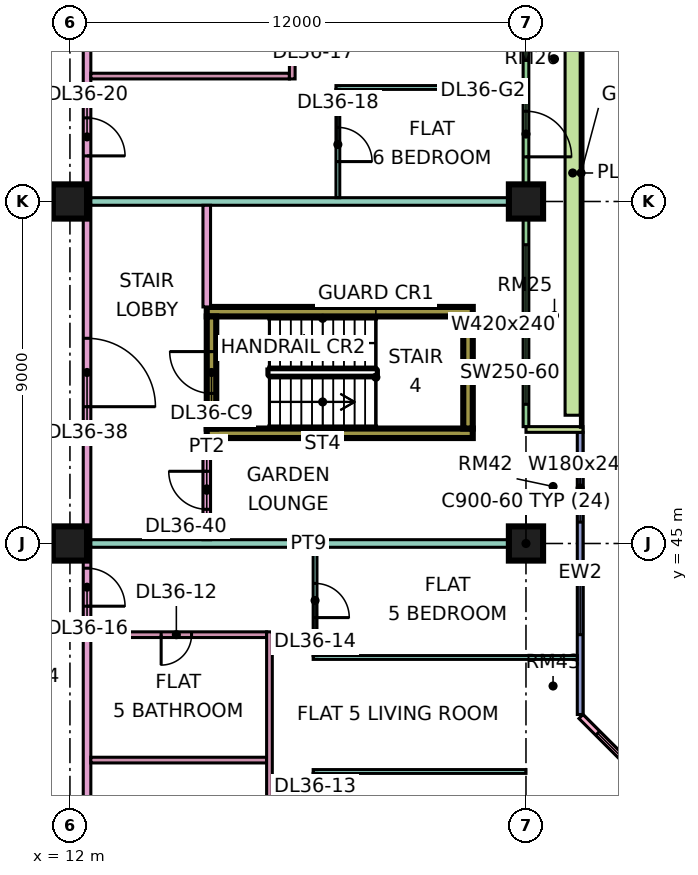
"""IFC4 building model, lengths in metres.
Left out: names, types, materials, properties, quantities, classifications, styles, units other than length and angle.
Written with IfcOpenShell. Run it as: python <this file> out.ifc"""

import sys

from ifc_helpers import new_model, si_unit, direction, frame, frame_2d, origin, origin_2d, place, context, subcontext, project, spatial, rectangle, extrude, element, fill, save


model = new_model("IFC4")
c1 = context("Model", 3, precision=1e-05, world=origin(), true_north=direction((0.0, 1.0)))
c2 = subcontext(c1, "Body", "Model", "MODEL_VIEW")
j1 = project(units=[si_unit("LENGTHUNIT", "METRE"), si_unit("PLANEANGLEUNIT", "RADIAN")], contexts=[c1])
p1 = place(None, origin())
s1 = spatial("IfcSite", under=j1, at=p1, CompositionType="ELEMENT")
p2 = place(p1, origin())
s2 = spatial("IfcBuilding", under=s1, at=p2, CompositionType="ELEMENT")
p3 = place(p2, frame((0.0, 0.0, 161.15)))
s3 = spatial("IfcBuildingStorey", under=s2, at=p3, CompositionType="ELEMENT", Elevation=161.15)
for number, where, z_axis, x_axis in (
    (1, (12.0, 45.0, 0.0), (0.0, 0.0, 1.0), (1.0, 0.0, 0.0)),
    (2, (12.0, 54.0, 0.0), (0.0, 0.0, 1.0), (1.0, 0.0, 0.0)),
    (3, (24.0, 45.0, 0.0), (0.0, 0.0, 1.0), (1.0, 0.0, 0.0)),
    (4, (24.0, 54.0, 0.0), (0.0, 0.0, 1.0), (1.0, 0.0, 0.0)),
):
    element("IfcColumn", number, at=place(p3, frame(where, z_axis=z_axis, x_axis=x_axis)), inside=s3, PredefinedType="COLUMN", context=c2, shape_type="SweptSolid", body=[
        extrude(rectangle(XDim=0.9, YDim=0.9, at=origin_2d()), origin(), (0.0, 0.0, 1.0), 3.75),
    ])
for number, where, z_axis, x_axis in (
    (5, (15.6, 47.9, 0.0), (0.0, 0.0, 1.0), (1.0, 0.0, 0.0)),
    (6, (15.6, 51.1, 0.0), (0.0, 0.0, 1.0), (1.0, 0.0, 0.0)),
):
    element("IfcWall", number, at=place(p3, frame(where, z_axis=z_axis, x_axis=x_axis)), inside=s3, PredefinedType="SHEAR", context=c2, shape_type="SweptSolid", body=[
        extrude(rectangle(XDim=7.0, YDim=0.25, at=frame_2d((3.5, 0.0))), origin(), (0.0, 0.0, 1.0), 3.75),
    ])
p4 = place(p3, frame((15.725, 48.025, 0.0), z_axis=(0.0, 0.0, 1.0), x_axis=(0.0, 1.0, 0.0)))
e7 = element("IfcWall", 7, at=p4, inside=s3, PredefinedType="SHEAR", context=c2, shape_type="SweptSolid", body=[
    extrude(rectangle(XDim=2.95, YDim=0.25, at=frame_2d((1.475, 0.0))), origin(), (0.0, 0.0, 1.0), 3.75),
])
p5 = place(p4, frame((0.925, 0.0, 0.0)))
e8 = element("IfcOpeningElement", 8, at=p5, cuts=e7, PredefinedType="OPENING", context=c2, shape_type="SweptSolid", body=[
    extrude(rectangle(XDim=1.1, YDim=2.2, at=frame_2d((0.55, 1.1))), frame((0.0, 0.135, 0.0), z_axis=(0.0, -1.0, 0.0), x_axis=(1.0, 0.0, 0.0)), (0.0, 0.0, 1.0), 0.27),
])
p6 = place(p3, frame((22.475, 48.025, 0.0), z_axis=(0.0, 0.0, 1.0), x_axis=(0.0, 1.0, 0.0)))
e9 = element("IfcWall", 9, at=p6, inside=s3, PredefinedType="SHEAR", context=c2, shape_type="SweptSolid", body=[
    extrude(rectangle(XDim=2.95, YDim=0.25, at=frame_2d((1.475, 0.0))), origin(), (0.0, 0.0, 1.0), 3.75),
])
p7 = place(p3, frame((28.447, 37.447, 0.0), z_axis=(0.0, 0.0, 1.0), x_axis=(-0.707106781187, 0.707106781187, 0.0)))
e10 = element("IfcWall", 10, at=p7, inside=s3, PredefinedType="SOLIDWALL", context=c2, shape_type="SweptSolid", body=[
    extrude(rectangle(XDim=4.243, YDim=0.15, at=frame_2d((2.121, 0.0))), origin(), (0.0, 0.0, 1.0), 3.35),
])
p8 = place(p7, frame((0.621, 0.0, 0.45)))
e11 = element("IfcOpeningElement", 11, at=p8, cuts=e10, PredefinedType="OPENING", context=c2, shape_type="SweptSolid", body=[
    extrude(rectangle(XDim=3.0, YDim=2.4, at=frame_2d((1.5, 1.2))), frame((0.0, 0.085, 0.0), z_axis=(0.0, -1.0, 0.0), x_axis=(1.0, 0.0, 0.0)), (0.0, 0.0, 1.0), 0.17),
])
p9 = place(p3, frame((25.425, 40.5, 0.0), z_axis=(0.0, 0.0, 1.0), x_axis=(0.0, 1.0, 0.0)))
e12 = element("IfcWall", 12, at=p9, inside=s3, PredefinedType="SOLIDWALL", context=c2, shape_type="SweptSolid", body=[
    extrude(rectangle(XDim=7.425, YDim=0.15, at=frame_2d((3.712, 0.0))), origin(), (0.0, 0.0, 1.0), 3.35),
])
p10 = place(p9, frame((2.1, 0.0, 0.45)))
e13 = element("IfcOpeningElement", 13, at=p10, cuts=e12, PredefinedType="OPENING", context=c2, shape_type="SweptSolid", body=[
    extrude(rectangle(XDim=1.8, YDim=2.4, at=frame_2d((0.9, 1.2))), frame((0.0, 0.085, 0.0), z_axis=(0.0, -1.0, 0.0), x_axis=(1.0, 0.0, 0.0)), (0.0, 0.0, 1.0), 0.17),
])
p11 = place(p9, frame((5.062, 0.0, 0.45)))
e14 = element("IfcOpeningElement", 14, at=p11, cuts=e12, PredefinedType="OPENING", context=c2, shape_type="SweptSolid", body=[
    extrude(rectangle(XDim=1.8, YDim=2.4, at=frame_2d((0.9, 1.2))), frame((0.0, 0.085, 0.0), z_axis=(0.0, -1.0, 0.0), x_axis=(1.0, 0.0, 0.0)), (0.0, 0.0, 1.0), 0.17),
])
p12 = place(p3, frame((24.0, 48.075, 0.0), z_axis=(0.0, 0.0, 1.0), x_axis=(0.0, 1.0, 0.0)))
e15 = element("IfcWall", 15, at=p12, inside=s3, PredefinedType="SOLIDWALL", context=c2, shape_type="SweptSolid", body=[
    extrude(rectangle(XDim=13.35, YDim=0.15, at=frame_2d((6.675, 0.0))), origin(), (0.0, 0.0, 1.0), 3.35),
])
p13 = place(p12, frame((0.587, 0.0, 0.45)))
e16 = element("IfcOpeningElement", 16, at=p13, cuts=e15, PredefinedType="OPENING", context=c2, shape_type="SweptSolid", body=[
    extrude(rectangle(XDim=4.2, YDim=2.4, at=frame_2d((2.1, 1.2))), frame((0.0, 0.085, 0.0), z_axis=(0.0, -1.0, 0.0), x_axis=(1.0, 0.0, 0.0)), (0.0, 0.0, 1.0), 0.17),
])
p14 = place(p12, frame((7.1, 0.0, 0.0)))
e17 = element("IfcOpeningElement", 17, at=p14, cuts=e15, PredefinedType="OPENING", context=c2, shape_type="SweptSolid", body=[
    extrude(rectangle(XDim=1.2, YDim=2.4, at=frame_2d((0.6, 1.2))), frame((0.0, 0.085, 0.0), z_axis=(0.0, -1.0, 0.0), x_axis=(1.0, 0.0, 0.0)), (0.0, 0.0, 1.0), 0.17),
])
p15 = place(p12, frame((9.637, 0.0, 0.45)))
e18 = element("IfcOpeningElement", 18, at=p15, cuts=e15, PredefinedType="OPENING", context=c2, shape_type="SweptSolid", body=[
    extrude(rectangle(XDim=3.0, YDim=2.4, at=frame_2d((1.5, 1.2))), frame((0.0, 0.085, 0.0), z_axis=(0.0, -1.0, 0.0), x_axis=(1.0, 0.0, 0.0)), (0.0, 0.0, 1.0), 0.17),
])
p16 = place(p3, frame((25.5, 48.0, 0.0), z_axis=(0.0, 0.0, 1.0), x_axis=(-1.0, 0.0, 0.0)))
e19 = element("IfcWall", 19, at=p16, inside=s3, PredefinedType="SOLIDWALL", context=c2, shape_type="SweptSolid", body=[
    extrude(rectangle(XDim=1.5, YDim=0.15, at=frame_2d((0.75, 0.0))), origin(), (0.0, 0.0, 1.0), 3.35),
])
p17 = place(p3, frame((25.229, 48.375, 0.0), z_axis=(0.0, 0.0, 1.0), x_axis=(0.0, 1.0, 0.0)))
e20 = element("IfcWall", 20, at=p17, inside=s3, PredefinedType="SOLIDWALL", context=c2, shape_type="SweptSolid", body=[
    extrude(rectangle(XDim=12.75, YDim=0.4, at=frame_2d((6.375, 0.0))), origin(), (0.0, 0.0, 1.0), 0.7),
])
p18 = place(p3, frame((12.45, 20.0, 0.0), z_axis=(0.0, 0.0, 1.0), x_axis=(0.0, 1.0, 0.0)))
e21 = element("IfcWall", 21, at=p18, inside=s3, PredefinedType="PARTITIONING", context=c2, shape_type="SweptSolid", body=[
    extrude(rectangle(XDim=43.0, YDim=0.2, at=frame_2d((21.5, 0.0))), origin(), (0.0, 0.0, 1.0), 3.35),
])
p19 = place(p18, frame((5.95, 0.0, 0.0)))
e22 = element("IfcOpeningElement", 22, at=p19, cuts=e21, PredefinedType="OPENING", context=c2, shape_type="SweptSolid", body=[
    extrude(rectangle(XDim=1.0, YDim=2.1, at=frame_2d((0.5, 1.05))), frame((0.0, 0.11, 0.0), z_axis=(0.0, -1.0, 0.0), x_axis=(1.0, 0.0, 0.0)), (0.0, 0.0, 1.0), 0.22),
])
p20 = place(p18, frame((12.0, 0.0, 0.0)))
e23 = element("IfcOpeningElement", 23, at=p20, cuts=e21, PredefinedType="OPENING", context=c2, shape_type="SweptSolid", body=[
    extrude(rectangle(XDim=1.0, YDim=2.1, at=frame_2d((0.5, 1.05))), frame((0.0, 0.11, 0.0), z_axis=(0.0, -1.0, 0.0), x_axis=(1.0, 0.0, 0.0)), (0.0, 0.0, 1.0), 0.22),
])
p21 = place(p18, frame((23.35, 0.0, 0.0)))
e24 = element("IfcOpeningElement", 24, at=p21, cuts=e21, PredefinedType="OPENING", context=c2, shape_type="SweptSolid", body=[
    extrude(rectangle(XDim=1.0, YDim=2.1, at=frame_2d((0.5, 1.05))), frame((0.0, 0.11, 0.0), z_axis=(0.0, -1.0, 0.0), x_axis=(1.0, 0.0, 0.0)), (0.0, 0.0, 1.0), 0.22),
])
p22 = place(p18, frame((35.2, 0.0, 0.0)))
e25 = element("IfcOpeningElement", 25, at=p22, cuts=e21, PredefinedType="OPENING", context=c2, shape_type="SweptSolid", body=[
    extrude(rectangle(XDim=1.0, YDim=2.1, at=frame_2d((0.5, 1.05))), frame((0.0, 0.11, 0.0), z_axis=(0.0, -1.0, 0.0), x_axis=(1.0, 0.0, 0.0)), (0.0, 0.0, 1.0), 0.22),
])
p23 = place(p18, frame((1.15, 0.0, 0.0)))
e26 = element("IfcOpeningElement", 26, at=p23, cuts=e21, PredefinedType="OPENING", context=c2, shape_type="SweptSolid", body=[
    extrude(rectangle(XDim=1.8, YDim=2.1, at=frame_2d((0.9, 1.05))), frame((0.0, 0.11, 0.0), z_axis=(0.0, -1.0, 0.0), x_axis=(1.0, 0.0, 0.0)), (0.0, 0.0, 1.0), 0.22),
])
p24 = place(p18, frame((28.6, 0.0, 0.0)))
e27 = element("IfcOpeningElement", 27, at=p24, cuts=e21, PredefinedType="OPENING", context=c2, shape_type="SweptSolid", body=[
    extrude(rectangle(XDim=1.8, YDim=2.1, at=frame_2d((0.9, 1.05))), frame((0.0, 0.11, 0.0), z_axis=(0.0, -1.0, 0.0), x_axis=(1.0, 0.0, 0.0)), (0.0, 0.0, 1.0), 0.22),
])
p25 = place(p3, frame((12.55, 39.3, 0.0), z_axis=(0.0, 0.0, 1.0), x_axis=(1.0, 0.0, 0.0)))
e28 = element("IfcWall", 28, at=p25, inside=s3, PredefinedType="PARTITIONING", context=c2, shape_type="SweptSolid", body=[
    extrude(rectangle(XDim=4.625, YDim=0.15, at=frame_2d((2.312, 0.0))), origin(), (0.0, 0.0, 1.0), 3.35),
])
p26 = place(p3, frame((12.55, 42.6, 0.0), z_axis=(0.0, 0.0, 1.0), x_axis=(1.0, 0.0, 0.0)))
e29 = element("IfcWall", 29, at=p26, inside=s3, PredefinedType="PARTITIONING", context=c2, shape_type="SweptSolid", body=[
    extrude(rectangle(XDim=4.625, YDim=0.15, at=frame_2d((2.312, 0.0))), origin(), (0.0, 0.0, 1.0), 3.35),
])
p27 = place(p26, frame((1.85, 0.0, 0.0)))
e30 = element("IfcOpeningElement", 30, at=p27, cuts=e29, PredefinedType="OPENING", context=c2, shape_type="SweptSolid", body=[
    extrude(rectangle(XDim=0.8, YDim=2.1, at=frame_2d((0.4, 1.05))), frame((0.0, 0.085, 0.0), z_axis=(0.0, -1.0, 0.0), x_axis=(1.0, 0.0, 0.0)), (0.0, 0.0, 1.0), 0.17),
])
p28 = place(p3, frame((12.55, 45.0, 0.0), z_axis=(0.0, 0.0, 1.0), x_axis=(1.0, 0.0, 0.0)))
e31 = element("IfcWall", 31, at=p28, inside=s3, PredefinedType="PARTITIONING", context=c2, shape_type="SweptSolid", body=[
    extrude(rectangle(XDim=11.45, YDim=0.2, at=frame_2d((5.725, 0.0))), origin(), (0.0, 0.0, 1.0), 3.35),
])
p29 = place(p3, frame((12.55, 54.0, 0.0), z_axis=(0.0, 0.0, 1.0), x_axis=(1.0, 0.0, 0.0)))
e32 = element("IfcWall", 32, at=p29, inside=s3, PredefinedType="PARTITIONING", context=c2, shape_type="SweptSolid", body=[
    extrude(rectangle(XDim=11.376, YDim=0.2, at=frame_2d((5.688, 0.0))), origin(), (0.0, 0.0, 1.0), 3.35),
])
p30 = place(p3, frame((12.55, 57.3, 0.0), z_axis=(0.0, 0.0, 1.0), x_axis=(1.0, 0.0, 0.0)))
e33 = element("IfcWall", 33, at=p30, inside=s3, PredefinedType="PARTITIONING", context=c2, shape_type="SweptSolid", body=[
    extrude(rectangle(XDim=5.225, YDim=0.15, at=frame_2d((2.612, 0.0))), origin(), (0.0, 0.0, 1.0), 3.35),
])
p31 = place(p3, frame((15.6, 45.1, 0.0), z_axis=(0.0, 0.0, 1.0), x_axis=(0.0, 1.0, 0.0)))
e34 = element("IfcWall", 34, at=p31, inside=s3, PredefinedType="PARTITIONING", context=c2, shape_type="SweptSolid", body=[
    extrude(rectangle(XDim=2.675, YDim=0.2, at=frame_2d((1.337, 0.0))), origin(), (0.0, 0.0, 1.0), 3.35),
])
p32 = place(p31, frame((0.8, 0.0, 0.0)))
e35 = element("IfcOpeningElement", 35, at=p32, cuts=e34, PredefinedType="OPENING", context=c2, shape_type="SweptSolid", body=[
    extrude(rectangle(XDim=1.0, YDim=2.1, at=frame_2d((0.5, 1.05))), frame((0.0, 0.11, 0.0), z_axis=(0.0, -1.0, 0.0), x_axis=(1.0, 0.0, 0.0)), (0.0, 0.0, 1.0), 0.22),
])
p33 = place(p3, frame((15.6, 51.225, 0.0), z_axis=(0.0, 0.0, 1.0), x_axis=(0.0, 1.0, 0.0)))
e36 = element("IfcWall", 36, at=p33, inside=s3, PredefinedType="PARTITIONING", context=c2, shape_type="SweptSolid", body=[
    extrude(rectangle(XDim=2.675, YDim=0.2, at=frame_2d((1.337, 0.0))), origin(), (0.0, 0.0, 1.0), 3.35),
])
p34 = place(p3, frame((17.25, 36.1, 0.0), z_axis=(0.0, 0.0, 1.0), x_axis=(0.0, 1.0, 0.0)))
e37 = element("IfcWall", 37, at=p34, inside=s3, PredefinedType="PARTITIONING", context=c2, shape_type="SweptSolid", body=[
    extrude(rectangle(XDim=6.575, YDim=0.15, at=frame_2d((3.288, 0.0))), origin(), (0.0, 0.0, 1.0), 3.35),
])
p35 = place(p34, frame((1.1, 0.0, 0.0)))
e38 = element("IfcOpeningElement", 38, at=p35, cuts=e37, PredefinedType="OPENING", context=c2, shape_type="SweptSolid", body=[
    extrude(rectangle(XDim=0.9, YDim=2.1, at=frame_2d((0.45, 1.05))), frame((0.0, 0.085, 0.0), z_axis=(0.0, -1.0, 0.0), x_axis=(1.0, 0.0, 0.0)), (0.0, 0.0, 1.0), 0.17),
])
p36 = place(p3, frame((17.85, 57.225, 0.0), z_axis=(0.0, 0.0, 1.0), x_axis=(0.0, 1.0, 0.0)))
e39 = element("IfcWall", 39, at=p36, inside=s3, PredefinedType="PARTITIONING", context=c2, shape_type="SweptSolid", body=[
    extrude(rectangle(XDim=7.125, YDim=0.15, at=frame_2d((3.562, 0.0))), origin(), (0.0, 0.0, 1.0), 3.35),
])
p37 = place(p36, frame((1.225, 0.0, 0.0)))
e40 = element("IfcOpeningElement", 40, at=p37, cuts=e39, PredefinedType="OPENING", context=c2, shape_type="SweptSolid", body=[
    extrude(rectangle(XDim=0.8, YDim=2.1, at=frame_2d((0.4, 1.05))), frame((0.0, 0.085, 0.0), z_axis=(0.0, -1.0, 0.0), x_axis=(1.0, 0.0, 0.0)), (0.0, 0.0, 1.0), 0.17),
])
p38 = place(p36, frame((3.975, 0.0, 0.0)))
e41 = element("IfcOpeningElement", 41, at=p38, cuts=e39, PredefinedType="OPENING", context=c2, shape_type="SweptSolid", body=[
    extrude(rectangle(XDim=0.9, YDim=2.1, at=frame_2d((0.45, 1.05))), frame((0.0, 0.085, 0.0), z_axis=(0.0, -1.0, 0.0), x_axis=(1.0, 0.0, 0.0)), (0.0, 0.0, 1.0), 0.17),
])
p39 = place(p3, frame((18.4, 39.0, 0.0), z_axis=(0.0, 0.0, 1.0), x_axis=(1.0, 0.0, 0.0)))
e42 = element("IfcWall", 42, at=p39, inside=s3, PredefinedType="PARTITIONING", context=c2, shape_type="SweptSolid", body=[
    extrude(rectangle(XDim=5.6, YDim=0.1, at=frame_2d((2.8, 0.0))), origin(), (0.0, 0.0, 1.0), 3.35),
])
p40 = place(p3, frame((18.4, 42.0, 0.0), z_axis=(0.0, 0.0, 1.0), x_axis=(1.0, 0.0, 0.0)))
e43 = element("IfcWall", 43, at=p40, inside=s3, PredefinedType="PARTITIONING", context=c2, shape_type="SweptSolid", body=[
    extrude(rectangle(XDim=6.95, YDim=0.1, at=frame_2d((3.475, 0.0))), origin(), (0.0, 0.0, 1.0), 3.35),
])
p41 = place(p3, frame((18.45, 36.1, 0.0), z_axis=(0.0, 0.0, 1.0), x_axis=(0.0, 1.0, 0.0)))
e44 = element("IfcWall", 44, at=p41, inside=s3, PredefinedType="PARTITIONING", context=c2, shape_type="SweptSolid", body=[
    extrude(rectangle(XDim=2.85, YDim=0.1, at=frame_2d((1.425, 0.0))), origin(), (0.0, 0.0, 1.0), 3.35),
])
p42 = place(p41, frame((0.95, 0.0, 0.0)))
e45 = element("IfcOpeningElement", 45, at=p42, cuts=e44, PredefinedType="OPENING", context=c2, shape_type="SweptSolid", body=[
    extrude(rectangle(XDim=0.9, YDim=2.1, at=frame_2d((0.45, 1.05))), frame((0.0, 0.06, 0.0), z_axis=(0.0, -1.0, 0.0), x_axis=(1.0, 0.0, 0.0)), (0.0, 0.0, 1.0), 0.12),
])
p43 = place(p3, frame((18.45, 42.05, 0.0), z_axis=(0.0, 0.0, 1.0), x_axis=(0.0, 1.0, 0.0)))
e46 = element("IfcWall", 46, at=p43, inside=s3, PredefinedType="PARTITIONING", context=c2, shape_type="SweptSolid", body=[
    extrude(rectangle(XDim=2.85, YDim=0.1, at=frame_2d((1.425, 0.0))), origin(), (0.0, 0.0, 1.0), 3.35),
])
p44 = place(p43, frame((1.0, 0.0, 0.0)))
e47 = element("IfcOpeningElement", 47, at=p44, cuts=e46, PredefinedType="OPENING", context=c2, shape_type="SweptSolid", body=[
    extrude(rectangle(XDim=0.9, YDim=2.1, at=frame_2d((0.45, 1.05))), frame((0.0, 0.06, 0.0), z_axis=(0.0, -1.0, 0.0), x_axis=(1.0, 0.0, 0.0)), (0.0, 0.0, 1.0), 0.12),
])
p45 = place(p3, frame((19.0, 57.0, 0.0), z_axis=(0.0, 0.0, 1.0), x_axis=(1.0, 0.0, 0.0)))
e48 = element("IfcWall", 48, at=p45, inside=s3, PredefinedType="PARTITIONING", context=c2, shape_type="SweptSolid", body=[
    extrude(rectangle(XDim=4.926, YDim=0.1, at=frame_2d((2.463, 0.0))), origin(), (0.0, 0.0, 1.0), 3.35),
])
p46 = place(p3, frame((19.05, 54.1, 0.0), z_axis=(0.0, 0.0, 1.0), x_axis=(0.0, 1.0, 0.0)))
e49 = element("IfcWall", 49, at=p46, inside=s3, PredefinedType="PARTITIONING", context=c2, shape_type="SweptSolid", body=[
    extrude(rectangle(XDim=2.85, YDim=0.1, at=frame_2d((1.425, 0.0))), origin(), (0.0, 0.0, 1.0), 3.35),
])
p47 = place(p46, frame((0.95, 0.0, 0.0)))
e50 = element("IfcOpeningElement", 50, at=p47, cuts=e49, PredefinedType="OPENING", context=c2, shape_type="SweptSolid", body=[
    extrude(rectangle(XDim=0.9, YDim=2.1, at=frame_2d((0.45, 1.05))), frame((0.0, 0.06, 0.0), z_axis=(0.0, -1.0, 0.0), x_axis=(1.0, 0.0, 0.0)), (0.0, 0.0, 1.0), 0.12),
])
p48 = place(p8, origin())
e51 = element("IfcWindow", 51, at=p48, inside=s3, PartitioningType="SINGLE_PANEL", PredefinedType="WINDOW", context=c2, shape_type="SweptSolid", body=[
    extrude(rectangle(XDim=3.0, YDim=2.4, at=frame_2d((1.5, 1.2))), frame((0.0, 0.03, 0.0), z_axis=(0.0, -1.0, 0.0), x_axis=(1.0, 0.0, 0.0)), (0.0, 0.0, 1.0), 0.06),
])
fill(e11, e51)
p49 = place(p10, origin())
e52 = element("IfcWindow", 52, at=p49, inside=s3, PartitioningType="SINGLE_PANEL", PredefinedType="WINDOW", context=c2, shape_type="SweptSolid", body=[
    extrude(rectangle(XDim=1.8, YDim=2.4, at=frame_2d((0.9, 1.2))), frame((0.0, 0.03, 0.0), z_axis=(0.0, -1.0, 0.0), x_axis=(1.0, 0.0, 0.0)), (0.0, 0.0, 1.0), 0.06),
])
fill(e13, e52)
p50 = place(p11, origin())
e53 = element("IfcWindow", 53, at=p50, inside=s3, PartitioningType="SINGLE_PANEL", PredefinedType="WINDOW", context=c2, shape_type="SweptSolid", body=[
    extrude(rectangle(XDim=1.8, YDim=2.4, at=frame_2d((0.9, 1.2))), frame((0.0, 0.03, 0.0), z_axis=(0.0, -1.0, 0.0), x_axis=(1.0, 0.0, 0.0)), (0.0, 0.0, 1.0), 0.06),
])
fill(e14, e53)
p51 = place(p13, origin())
e54 = element("IfcWindow", 54, at=p51, inside=s3, PartitioningType="SINGLE_PANEL", PredefinedType="WINDOW", context=c2, shape_type="SweptSolid", body=[
    extrude(rectangle(XDim=4.2, YDim=2.4, at=frame_2d((2.1, 1.2))), frame((0.0, 0.03, 0.0), z_axis=(0.0, -1.0, 0.0), x_axis=(1.0, 0.0, 0.0)), (0.0, 0.0, 1.0), 0.06),
])
fill(e16, e54)
p52 = place(p14, frame((1.2, 0.0, 0.0), z_axis=(0.0, 0.0, 1.0), x_axis=(-1.0, 0.0, 0.0)))
e55 = element("IfcDoor", 55, at=p52, inside=s3, OperationType="DOUBLE_DOOR_SINGLE_SWING", PredefinedType="DOOR", context=c2, shape_type="SweptSolid", body=[
    extrude(rectangle(XDim=1.2, YDim=2.4, at=frame_2d((0.6, 1.2))), frame((0.0, 0.025, 0.0), z_axis=(0.0, -1.0, 0.0), x_axis=(1.0, 0.0, 0.0)), (0.0, 0.0, 1.0), 0.05),
])
fill(e17, e55)
p53 = place(p15, origin())
e56 = element("IfcWindow", 56, at=p53, inside=s3, PartitioningType="SINGLE_PANEL", PredefinedType="WINDOW", context=c2, shape_type="SweptSolid", body=[
    extrude(rectangle(XDim=3.0, YDim=2.4, at=frame_2d((1.5, 1.2))), frame((0.0, 0.03, 0.0), z_axis=(0.0, -1.0, 0.0), x_axis=(1.0, 0.0, 0.0)), (0.0, 0.0, 1.0), 0.06),
])
fill(e18, e56)
p54 = place(p5, frame((1.1, 0.0, 0.0), z_axis=(0.0, 0.0, 1.0), x_axis=(-1.0, 0.0, 0.0)))
e57 = element("IfcDoor", 57, at=p54, inside=s3, OperationType="SINGLE_SWING_RIGHT", PredefinedType="DOOR", context=c2, shape_type="SweptSolid", body=[
    extrude(rectangle(XDim=1.1, YDim=2.2, at=frame_2d((0.55, 1.1))), frame((0.0, 0.025, 0.0), z_axis=(0.0, -1.0, 0.0), x_axis=(1.0, 0.0, 0.0)), (0.0, 0.0, 1.0), 0.05),
])
fill(e8, e57)
p55 = place(p27, frame((0.8, 0.0, 0.0), z_axis=(0.0, 0.0, 1.0), x_axis=(-1.0, 0.0, 0.0)))
e58 = element("IfcDoor", 58, at=p55, inside=s3, OperationType="SINGLE_SWING_LEFT", PredefinedType="DOOR", context=c2, shape_type="SweptSolid", body=[
    extrude(rectangle(XDim=0.8, YDim=2.1, at=frame_2d((0.4, 1.05))), frame((0.0, 0.025, 0.0), z_axis=(0.0, -1.0, 0.0), x_axis=(1.0, 0.0, 0.0)), (0.0, 0.0, 1.0), 0.05),
])
fill(e30, e58)
p56 = place(p44, frame((0.9, 0.0, 0.0), z_axis=(0.0, 0.0, 1.0), x_axis=(-1.0, 0.0, 0.0)))
e59 = element("IfcDoor", 59, at=p56, inside=s3, OperationType="SINGLE_SWING_LEFT", PredefinedType="DOOR", context=c2, shape_type="SweptSolid", body=[
    extrude(rectangle(XDim=0.9, YDim=2.1, at=frame_2d((0.45, 1.05))), frame((0.0, 0.025, 0.0), z_axis=(0.0, -1.0, 0.0), x_axis=(1.0, 0.0, 0.0)), (0.0, 0.0, 1.0), 0.05),
])
fill(e47, e59)
p57 = place(p21, frame((1.0, 0.0, 0.0), z_axis=(0.0, 0.0, 1.0), x_axis=(-1.0, 0.0, 0.0)))
e60 = element("IfcDoor", 60, at=p57, inside=s3, OperationType="SINGLE_SWING_LEFT", PredefinedType="DOOR", context=c2, shape_type="SweptSolid", body=[
    extrude(rectangle(XDim=1.0, YDim=2.1, at=frame_2d((0.5, 1.05))), frame((0.0, 0.025, 0.0), z_axis=(0.0, -1.0, 0.0), x_axis=(1.0, 0.0, 0.0)), (0.0, 0.0, 1.0), 0.05),
])
fill(e24, e60)
p58 = place(p47, frame((0.9, 0.0, 0.0), z_axis=(0.0, 0.0, 1.0), x_axis=(-1.0, 0.0, 0.0)))
e61 = element("IfcDoor", 61, at=p58, inside=s3, OperationType="SINGLE_SWING_LEFT", PredefinedType="DOOR", context=c2, shape_type="SweptSolid", body=[
    extrude(rectangle(XDim=0.9, YDim=2.1, at=frame_2d((0.45, 1.05))), frame((0.0, 0.025, 0.0), z_axis=(0.0, -1.0, 0.0), x_axis=(1.0, 0.0, 0.0)), (0.0, 0.0, 1.0), 0.05),
])
fill(e50, e61)
p59 = place(p22, frame((1.0, 0.0, 0.0), z_axis=(0.0, 0.0, 1.0), x_axis=(-1.0, 0.0, 0.0)))
e62 = element("IfcDoor", 62, at=p59, inside=s3, OperationType="SINGLE_SWING_LEFT", PredefinedType="DOOR", context=c2, shape_type="SweptSolid", body=[
    extrude(rectangle(XDim=1.0, YDim=2.1, at=frame_2d((0.5, 1.05))), frame((0.0, 0.025, 0.0), z_axis=(0.0, -1.0, 0.0), x_axis=(1.0, 0.0, 0.0)), (0.0, 0.0, 1.0), 0.05),
])
fill(e25, e62)
p60 = place(p24, frame((1.8, 0.0, 0.0), z_axis=(0.0, 0.0, 1.0), x_axis=(-1.0, 0.0, 0.0)))
e63 = element("IfcDoor", 63, at=p60, inside=s3, OperationType="DOUBLE_DOOR_SINGLE_SWING", PredefinedType="DOOR", context=c2, shape_type="SweptSolid", body=[
    extrude(rectangle(XDim=1.8, YDim=2.1, at=frame_2d((0.9, 1.05))), frame((0.0, 0.025, 0.0), z_axis=(0.0, -1.0, 0.0), x_axis=(1.0, 0.0, 0.0)), (0.0, 0.0, 1.0), 0.05),
])
fill(e27, e63)
p61 = place(p32, frame((1.0, 0.0, 0.0), z_axis=(0.0, 0.0, 1.0), x_axis=(-1.0, 0.0, 0.0)))
e64 = element("IfcDoor", 64, at=p61, inside=s3, OperationType="SINGLE_SWING_RIGHT", PredefinedType="DOOR", context=c2, shape_type="SweptSolid", body=[
    extrude(rectangle(XDim=1.0, YDim=2.1, at=frame_2d((0.5, 1.05))), frame((0.0, 0.025, 0.0), z_axis=(0.0, -1.0, 0.0), x_axis=(1.0, 0.0, 0.0)), (0.0, 0.0, 1.0), 0.05),
])
fill(e35, e64)
save(model, sys.argv[1])
